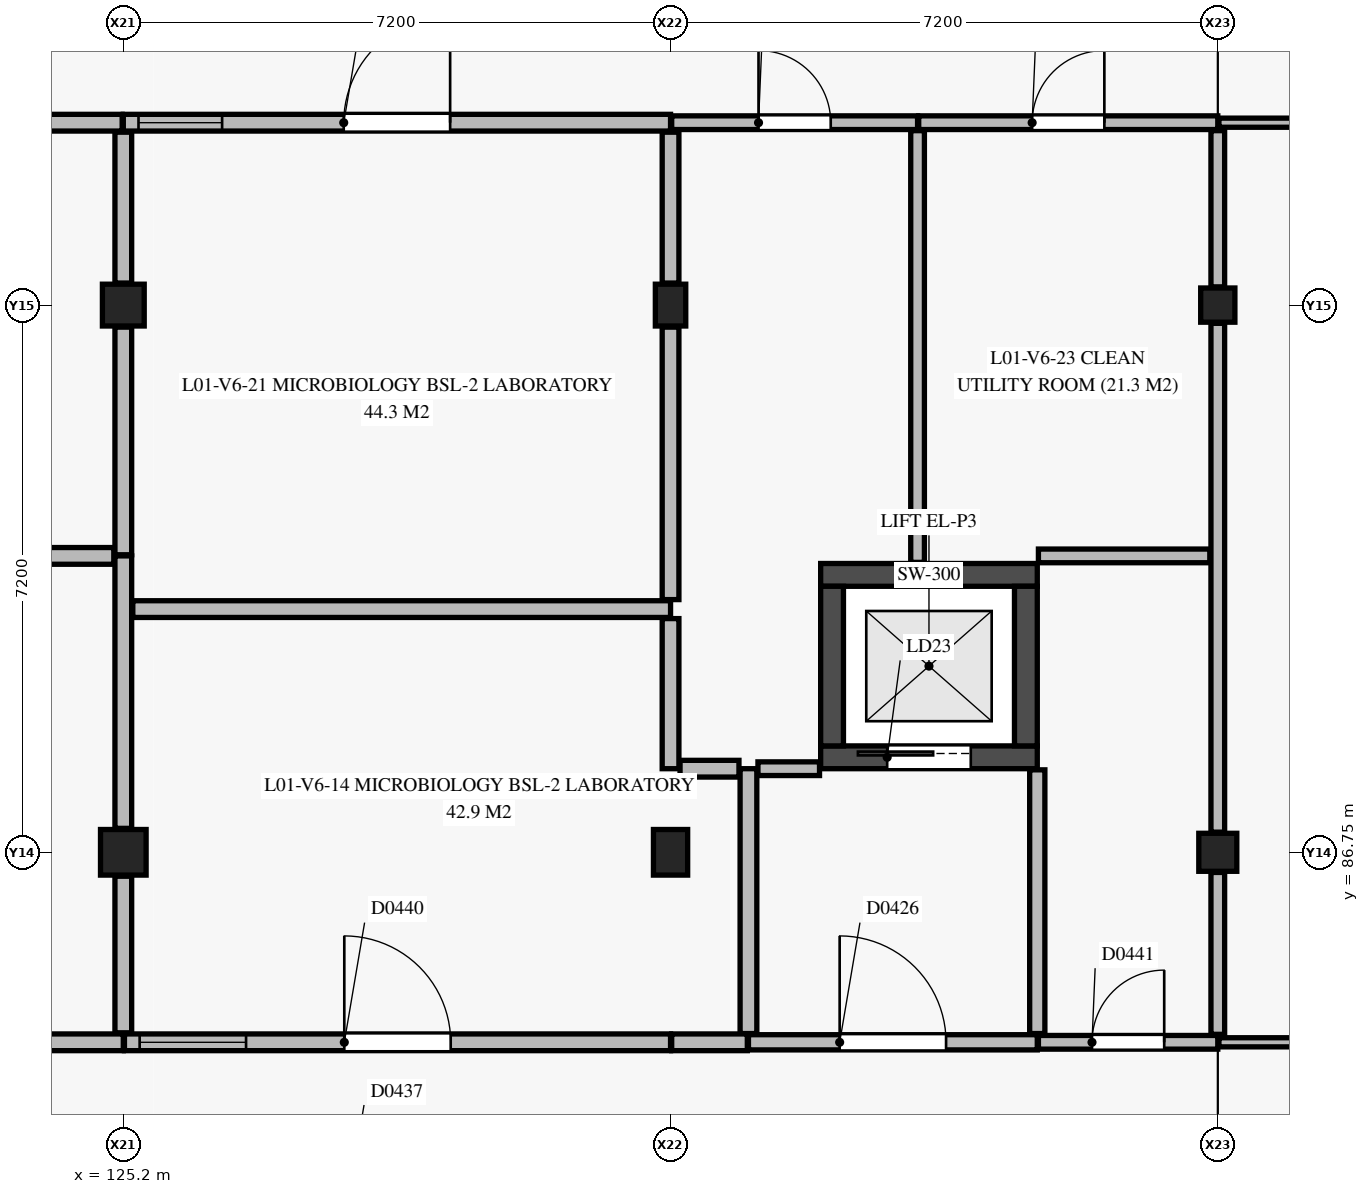
"""IFC4 building model, lengths in metres.
Left out: names, types, materials, properties, quantities, classifications, styles, units other than length and angle.
Written with IfcOpenShell. Run it as: python <this file> out.ifc"""

import sys

from ifc_helpers import new_model, si_unit, direction, frame, frame_2d, origin, origin_2d, place, context, subcontext, project, spatial, rectangle, extrude, element, fill, save


model = new_model("IFC4")
c1 = context("Model", 3, precision=1e-05, world=origin(), true_north=direction((0.0, 1.0)))
c2 = subcontext(c1, "Body", "Model", "MODEL_VIEW")
j1 = project(units=[si_unit("LENGTHUNIT", "METRE"), si_unit("PLANEANGLEUNIT", "RADIAN")], contexts=[c1])
p1 = place(None, origin())
s1 = spatial("IfcSite", under=j1, at=p1, CompositionType="ELEMENT")
p2 = place(p1, origin())
s2 = spatial("IfcBuilding", under=s1, at=p2, CompositionType="ELEMENT")
p3 = place(p2, frame((0.0, 0.0, 4.8)))
s3 = spatial("IfcBuildingStorey", under=s2, at=p3, CompositionType="ELEMENT", Elevation=4.8)
p4 = place(p3, frame((125.2, 86.75, 0.0), z_axis=(0.0, 0.0, 1.0), x_axis=(1.0, 0.0, 0.0)))
e1 = element("IfcColumn", 1, at=p4, inside=s3, PredefinedType="COLUMN", context=c2, shape_type="SweptSolid", body=[
    extrude(rectangle(XDim=0.6, YDim=0.6, at=origin_2d()), origin(), (0.0, 0.0, 1.0), 4.2),
])
p5 = place(p3, frame((125.2, 93.95, 0.0), z_axis=(0.0, 0.0, 1.0), x_axis=(1.0, 0.0, 0.0)))
e2 = element("IfcColumn", 2, at=p5, inside=s3, PredefinedType="COLUMN", context=c2, shape_type="SweptSolid", body=[
    extrude(rectangle(XDim=0.55, YDim=0.55, at=origin_2d()), origin(), (0.0, 0.0, 1.0), 4.2),
])
p6 = place(p3, frame((132.4, 86.75, 0.0), z_axis=(0.0, 0.0, 1.0), x_axis=(1.0, 0.0, 0.0)))
e3 = element("IfcColumn", 3, at=p6, inside=s3, PredefinedType="COLUMN", context=c2, shape_type="SweptSolid", body=[
    extrude(rectangle(XDim=0.45, YDim=0.6, at=origin_2d()), origin(), (0.0, 0.0, 1.0), 4.2),
])
p7 = place(p3, frame((132.4, 93.95, 0.0), z_axis=(0.0, 0.0, 1.0), x_axis=(1.0, 0.0, 0.0)))
e4 = element("IfcColumn", 4, at=p7, inside=s3, PredefinedType="COLUMN", context=c2, shape_type="SweptSolid", body=[
    extrude(rectangle(XDim=0.4, YDim=0.55, at=origin_2d()), origin(), (0.0, 0.0, 1.0), 4.2),
])
p8 = place(p3, frame((139.6, 86.75, 0.0), z_axis=(0.0, 0.0, 1.0), x_axis=(1.0, 0.0, 0.0)))
e5 = element("IfcColumn", 5, at=p8, inside=s3, PredefinedType="COLUMN", context=c2, shape_type="SweptSolid", body=[
    extrude(rectangle(XDim=0.5, YDim=0.5, at=origin_2d()), origin(), (0.0, 0.0, 1.0), 4.2),
])
p9 = place(p3, frame((139.6, 93.95, 0.0), z_axis=(0.0, 0.0, 1.0), x_axis=(1.0, 0.0, 0.0)))
e6 = element("IfcColumn", 6, at=p9, inside=s3, PredefinedType="COLUMN", context=c2, shape_type="SweptSolid", body=[
    extrude(rectangle(XDim=0.45, YDim=0.45, at=origin_2d()), origin(), (0.0, 0.0, 1.0), 4.2),
])
p10 = place(p3, frame((134.375, 88.0, 0.0), z_axis=(0.0, 0.0, 1.0), x_axis=(1.0, 0.0, 0.0)))
e7 = element("IfcWall", 7, at=p10, inside=s3, PredefinedType="SHEAR", context=c2, shape_type="SweptSolid", body=[
    extrude(rectangle(XDim=2.85, YDim=0.3, at=frame_2d((1.425, 0.0))), origin(), (0.0, 0.0, 1.0), 3.95),
])
p11 = place(p10, frame((0.875, 0.0, 0.0)))
e8 = element("IfcOpeningElement", 8, at=p11, cuts=e7, PredefinedType="OPENING", context=c2, shape_type="SweptSolid", body=[
    extrude(rectangle(XDim=1.1, YDim=2.15, at=frame_2d((0.55, 1.075))), frame((0.0, 0.16, 0.0), z_axis=(0.0, -1.0, 0.0), x_axis=(1.0, 0.0, 0.0)), (0.0, 0.0, 1.0), 0.32),
])
p12 = place(p3, frame((134.375, 90.4, 0.0), z_axis=(0.0, 0.0, 1.0), x_axis=(1.0, 0.0, 0.0)))
e9 = element("IfcWall", 9, at=p12, inside=s3, PredefinedType="SHEAR", context=c2, shape_type="SweptSolid", body=[
    extrude(rectangle(XDim=2.85, YDim=0.3, at=frame_2d((1.425, 0.0))), origin(), (0.0, 0.0, 1.0), 3.95),
])
for number, where, z_axis, x_axis in (
    (10, (134.525, 88.15, 0.0), (0.0, 0.0, 1.0), (0.0, 1.0, 0.0)),
    (11, (137.075, 88.15, 0.0), (0.0, 0.0, 1.0), (0.0, 1.0, 0.0)),
):
    element("IfcWall", number, at=place(p3, frame(where, z_axis=z_axis, x_axis=x_axis)), inside=s3, PredefinedType="SHEAR", context=c2, shape_type="SweptSolid", body=[
        extrude(rectangle(XDim=2.1, YDim=0.3, at=frame_2d((1.05, 0.0))), origin(), (0.0, 0.0, 1.0), 3.95),
    ])
p13 = place(p3, frame((133.425, 84.25, 0.0), z_axis=(0.0, 0.0, 1.0), x_axis=(1.0, 0.0, 0.0)))
e12 = element("IfcWall", 12, at=p13, inside=s3, PredefinedType="PARTITIONING", context=c2, shape_type="SweptSolid", body=[
    extrude(rectangle(XDim=3.8, YDim=0.2, at=frame_2d((1.9, 0.0))), origin(), (0.0, 0.0, 1.0), 3.475),
])
p14 = place(p13, frame((1.2, 0.0, 0.0)))
e13 = element("IfcOpeningElement", 13, at=p14, cuts=e12, PredefinedType="OPENING", context=c2, shape_type="SweptSolid", body=[
    extrude(rectangle(XDim=1.4, YDim=2.2, at=frame_2d((0.7, 1.1))), frame((0.0, 0.11, 0.0), z_axis=(0.0, -1.0, 0.0), x_axis=(1.0, 0.0, 0.0)), (0.0, 0.0, 1.0), 0.22),
])
p15 = place(p3, frame((133.425, 84.365, 0.0), z_axis=(0.0, 0.0, 1.0), x_axis=(0.0, 1.0, 0.0)))
e14 = element("IfcWall", 14, at=p15, inside=s3, PredefinedType="PARTITIONING", context=c2, shape_type="SweptSolid", body=[
    extrude(rectangle(XDim=3.485, YDim=0.22, at=frame_2d((1.743, 0.0))), origin(), (0.0, 0.0, 1.0), 3.415),
])
p16 = place(p3, frame((137.225, 84.365, 0.0), z_axis=(0.0, 0.0, 1.0), x_axis=(0.0, 1.0, 0.0)))
e15 = element("IfcWall", 15, at=p16, inside=s3, PredefinedType="PARTITIONING", context=c2, shape_type="SweptSolid", body=[
    extrude(rectangle(XDim=3.47, YDim=0.2, at=frame_2d((1.735, 0.0))), origin(), (0.0, 0.0, 1.0), 3.415),
])
p17 = place(p3, frame((122.8, 84.25, 0.0), z_axis=(0.0, 0.0, 1.0), x_axis=(1.0, 0.0, 0.0)))
e16 = element("IfcWall", 16, at=p17, inside=s3, PredefinedType="PARTITIONING", context=c2, shape_type="SweptSolid", body=[
    extrude(rectangle(XDim=2.4, YDim=0.22, at=frame_2d((1.2, 0.0))), origin(), (0.0, 0.0, 1.0), 3.135),
])
p18 = place(p3, frame((125.215, 84.25, 0.0), z_axis=(0.0, 0.0, 1.0), x_axis=(1.0, 0.0, 0.0)))
e17 = element("IfcWall", 17, at=p18, inside=s3, PredefinedType="PARTITIONING", context=c2, shape_type="SweptSolid", body=[
    extrude(rectangle(XDim=7.185, YDim=0.22, at=frame_2d((3.592, 0.0))), origin(), (0.0, 0.0, 1.0), 3.135),
])
p19 = place(p18, frame((2.893, 0.0, 0.0)))
e18 = element("IfcOpeningElement", 18, at=p19, cuts=e17, PredefinedType="OPENING", context=c2, shape_type="SweptSolid", body=[
    extrude(rectangle(XDim=1.4, YDim=2.2, at=frame_2d((0.7, 1.1))), frame((0.0, 0.12, 0.0), z_axis=(0.0, -1.0, 0.0), x_axis=(1.0, 0.0, 0.0)), (0.0, 0.0, 1.0), 0.24),
])
p20 = place(p18, frame((0.2, 0.0, 1.05)))
e19 = element("IfcOpeningElement", 19, at=p20, cuts=e17, PredefinedType="OPENING", context=c2, shape_type="SweptSolid", body=[
    extrude(rectangle(XDim=1.4, YDim=1.1, at=frame_2d((0.7, 0.55))), frame((0.0, 0.12, 0.0), z_axis=(0.0, -1.0, 0.0), x_axis=(1.0, 0.0, 0.0)), (0.0, 0.0, 1.0), 0.24),
])
p21 = place(p3, frame((132.415, 84.25, 0.0), z_axis=(0.0, 0.0, 1.0), x_axis=(1.0, 0.0, 0.0)))
e20 = element("IfcWall", 20, at=p21, inside=s3, PredefinedType="PARTITIONING", context=c2, shape_type="SweptSolid", body=[
    extrude(rectangle(XDim=0.995, YDim=0.22, at=frame_2d((0.498, 0.0))), origin(), (0.0, 0.0, 1.0), 3.355),
])
p22 = place(p3, frame((125.2, 96.35, 0.0), z_axis=(0.0, 0.0, 1.0), x_axis=(1.0, 0.0, 0.0)))
e21 = element("IfcWall", 21, at=p22, inside=s3, PredefinedType="PARTITIONING", context=c2, shape_type="SweptSolid", body=[
    extrude(rectangle(XDim=7.2, YDim=0.22, at=frame_2d((3.6, 0.0))), origin(), (0.0, 0.0, 1.0), 3.135),
])
p23 = place(p22, frame((2.9, 0.0, 0.0)))
e22 = element("IfcOpeningElement", 22, at=p23, cuts=e21, PredefinedType="OPENING", context=c2, shape_type="SweptSolid", body=[
    extrude(rectangle(XDim=1.4, YDim=2.2, at=frame_2d((0.7, 1.1))), frame((0.0, 0.12, 0.0), z_axis=(0.0, -1.0, 0.0), x_axis=(1.0, 0.0, 0.0)), (0.0, 0.0, 1.0), 0.24),
])
p24 = place(p22, frame((0.2, 0.0, 1.05)))
e23 = element("IfcOpeningElement", 23, at=p24, cuts=e21, PredefinedType="OPENING", context=c2, shape_type="SweptSolid", body=[
    extrude(rectangle(XDim=1.1, YDim=1.1, at=frame_2d((0.55, 0.55))), frame((0.0, 0.12, 0.0), z_axis=(0.0, -1.0, 0.0), x_axis=(1.0, 0.0, 0.0)), (0.0, 0.0, 1.0), 0.24),
])
p25 = place(p3, frame((122.925, 96.35, 0.0), z_axis=(0.0, 0.0, 1.0), x_axis=(1.0, 0.0, 0.0)))
e24 = element("IfcWall", 24, at=p25, inside=s3, PredefinedType="PARTITIONING", context=c2, shape_type="SweptSolid", body=[
    extrude(rectangle(XDim=2.26, YDim=0.22, at=frame_2d((1.13, 0.0))), origin(), (0.0, 0.0, 1.0), 3.355),
])
p26 = place(p3, frame((137.24, 84.25, 0.0), z_axis=(0.0, 0.0, 1.0), x_axis=(1.0, 0.0, 0.0)))
e25 = element("IfcWall", 25, at=p26, inside=s3, PredefinedType="PLUMBINGWALL", context=c2, shape_type="SweptSolid", body=[
    extrude(rectangle(XDim=2.36, YDim=0.18, at=frame_2d((1.18, 0.0))), origin(), (0.0, 0.0, 1.0), 3.235),
])
p27 = place(p26, frame((0.705, 0.0, 0.0)))
e26 = element("IfcOpeningElement", 26, at=p27, cuts=e25, PredefinedType="OPENING", context=c2, shape_type="SweptSolid", body=[
    extrude(rectangle(XDim=0.95, YDim=2.1, at=frame_2d((0.475, 1.05))), frame((0.0, 0.1, 0.0), z_axis=(0.0, -1.0, 0.0), x_axis=(1.0, 0.0, 0.0)), (0.0, 0.0, 1.0), 0.2),
])
p28 = place(p3, frame((132.415, 96.35, 0.0), z_axis=(0.0, 0.0, 1.0), x_axis=(1.0, 0.0, 0.0)))
e27 = element("IfcWall", 27, at=p28, inside=s3, PredefinedType="PLUMBINGWALL", context=c2, shape_type="SweptSolid", body=[
    extrude(rectangle(XDim=3.235, YDim=0.18, at=frame_2d((1.617, 0.0))), origin(), (0.0, 0.0, 1.0), 3.135),
])
p29 = place(p28, frame((1.143, 0.0, 0.0)))
e28 = element("IfcOpeningElement", 28, at=p29, cuts=e27, PredefinedType="OPENING", context=c2, shape_type="SweptSolid", body=[
    extrude(rectangle(XDim=0.95, YDim=2.1, at=frame_2d((0.475, 1.05))), frame((0.0, 0.1, 0.0), z_axis=(0.0, -1.0, 0.0), x_axis=(1.0, 0.0, 0.0)), (0.0, 0.0, 1.0), 0.2),
])
p30 = place(p3, frame((135.665, 96.35, 0.0), z_axis=(0.0, 0.0, 1.0), x_axis=(1.0, 0.0, 0.0)))
e29 = element("IfcWall", 29, at=p30, inside=s3, PredefinedType="PLUMBINGWALL", context=c2, shape_type="SweptSolid", body=[
    extrude(rectangle(XDim=3.935, YDim=0.18, at=frame_2d((1.968, 0.0))), origin(), (0.0, 0.0, 1.0), 3.355),
])
p31 = place(p30, frame((1.492, 0.0, 0.0)))
e30 = element("IfcOpeningElement", 30, at=p31, cuts=e29, PredefinedType="OPENING", context=c2, shape_type="SweptSolid", body=[
    extrude(rectangle(XDim=0.95, YDim=2.1, at=frame_2d((0.475, 1.05))), frame((0.0, 0.1, 0.0), z_axis=(0.0, -1.0, 0.0), x_axis=(1.0, 0.0, 0.0)), (0.0, 0.0, 1.0), 0.2),
])
p32 = place(p3, frame((139.615, 84.25, 0.0), z_axis=(0.0, 0.0, 1.0), x_axis=(1.0, 0.0, 0.0)))
e31 = element("IfcWall", 31, at=p32, inside=s3, PredefinedType="PARTITIONING", context=c2, shape_type="SweptSolid", body=[
    extrude(rectangle(XDim=7.17, YDim=0.12, at=frame_2d((3.585, 0.0))), origin(), (0.0, 0.0, 1.0), 3.235),
])
p33 = place(p32, frame((3.06, 0.0, 0.0)))
e32 = element("IfcOpeningElement", 32, at=p33, cuts=e31, PredefinedType="OPENING", context=c2, shape_type="SweptSolid", body=[
    extrude(rectangle(XDim=1.05, YDim=2.15, at=frame_2d((0.525, 1.075))), frame((0.0, 0.07, 0.0), z_axis=(0.0, -1.0, 0.0), x_axis=(1.0, 0.0, 0.0)), (0.0, 0.0, 1.0), 0.14),
])
p34 = place(p3, frame((139.615, 96.35, 0.0), z_axis=(0.0, 0.0, 1.0), x_axis=(1.0, 0.0, 0.0)))
e33 = element("IfcWall", 33, at=p34, inside=s3, PredefinedType="PARTITIONING", context=c2, shape_type="SweptSolid", body=[
    extrude(rectangle(XDim=4.785, YDim=0.12, at=frame_2d((2.393, 0.0))), origin(), (0.0, 0.0, 1.0), 3.355),
])
p35 = place(p3, frame((125.2, 84.375, 0.0), z_axis=(0.0, 0.0, 1.0), x_axis=(0.0, 1.0, 0.0)))
e34 = element("IfcWall", 34, at=p35, inside=s3, PredefinedType="PARTITIONING", context=c2, shape_type="SweptSolid", body=[
    extrude(rectangle(XDim=2.06, YDim=0.22, at=frame_2d((1.03, 0.0))), origin(), (0.0, 0.0, 1.0), 3.135),
])
p36 = place(p3, frame((125.2, 87.065, 0.0), z_axis=(0.0, 0.0, 1.0), x_axis=(0.0, 1.0, 0.0)))
e35 = element("IfcWall", 35, at=p36, inside=s3, PredefinedType="PARTITIONING", context=c2, shape_type="SweptSolid", body=[
    extrude(rectangle(XDim=3.585, YDim=0.22, at=frame_2d((1.792, 0.0))), origin(), (0.0, 0.0, 1.0), 3.235),
])
p37 = place(p3, frame((122.925, 90.65, 0.0), z_axis=(0.0, 0.0, 1.0), x_axis=(1.0, 0.0, 0.0)))
e36 = element("IfcWall", 36, at=p37, inside=s3, PredefinedType="PARTITIONING", context=c2, shape_type="SweptSolid", body=[
    extrude(rectangle(XDim=2.15, YDim=0.22, at=frame_2d((1.075, 0.0))), origin(), (0.0, 0.0, 1.0), 3.95),
])
p38 = place(p3, frame((125.325, 89.95, 0.0), z_axis=(0.0, 0.0, 1.0), x_axis=(1.0, 0.0, 0.0)))
e37 = element("IfcWall", 37, at=p38, inside=s3, PredefinedType="PARTITIONING", context=c2, shape_type="SweptSolid", body=[
    extrude(rectangle(XDim=7.075, YDim=0.22, at=frame_2d((3.538, 0.0))), origin(), (0.0, 0.0, 1.0), 3.385),
])
p39 = place(p3, frame((132.4, 87.85, 0.0), z_axis=(0.0, 0.0, 1.0), x_axis=(0.0, 1.0, 0.0)))
e38 = element("IfcWall", 38, at=p39, inside=s3, PredefinedType="PARTITIONING", context=c2, shape_type="SweptSolid", body=[
    extrude(rectangle(XDim=1.975, YDim=0.22, at=frame_2d((0.987, 0.0))), origin(), (0.0, 0.0, 1.0), 3.385),
])
p40 = place(p3, frame((132.525, 87.85, 0.0), z_axis=(0.0, 0.0, 1.0), x_axis=(1.0, 0.0, 0.0)))
e39 = element("IfcWall", 39, at=p40, inside=s3, PredefinedType="PARTITIONING", context=c2, shape_type="SweptSolid", body=[
    extrude(rectangle(XDim=0.775, YDim=0.22, at=frame_2d((0.388, 0.0))), origin(), (0.0, 0.0, 1.0), 3.95),
])
p41 = place(p3, frame((132.4, 90.075, 0.0), z_axis=(0.0, 0.0, 1.0), x_axis=(0.0, 1.0, 0.0)))
e40 = element("IfcWall", 40, at=p41, inside=s3, PredefinedType="PARTITIONING", context=c2, shape_type="SweptSolid", body=[
    extrude(rectangle(XDim=3.585, YDim=0.22, at=frame_2d((1.792, 0.0))), origin(), (0.0, 0.0, 1.0), 3.385),
])
p42 = place(p3, frame((132.4, 94.24, 0.0), z_axis=(0.0, 0.0, 1.0), x_axis=(0.0, 1.0, 0.0)))
e41 = element("IfcWall", 41, at=p42, inside=s3, PredefinedType="PARTITIONING", context=c2, shape_type="SweptSolid", body=[
    extrude(rectangle(XDim=1.985, YDim=0.22, at=frame_2d((0.993, 0.0))), origin(), (0.0, 0.0, 1.0), 3.135),
])
p43 = place(p3, frame((125.2, 90.665, 0.0), z_axis=(0.0, 0.0, 1.0), x_axis=(0.0, 1.0, 0.0)))
e42 = element("IfcWall", 42, at=p43, inside=s3, PredefinedType="PARTITIONING", context=c2, shape_type="SweptSolid", body=[
    extrude(rectangle(XDim=2.995, YDim=0.22, at=frame_2d((1.498, 0.0))), origin(), (0.0, 0.0, 1.0), 3.235),
])
p44 = place(p3, frame((125.2, 94.24, 0.0), z_axis=(0.0, 0.0, 1.0), x_axis=(0.0, 1.0, 0.0)))
e43 = element("IfcWall", 43, at=p44, inside=s3, PredefinedType="PARTITIONING", context=c2, shape_type="SweptSolid", body=[
    extrude(rectangle(XDim=1.985, YDim=0.22, at=frame_2d((0.993, 0.0))), origin(), (0.0, 0.0, 1.0), 3.355),
])
p45 = place(p3, frame((139.6, 84.355, 0.0), z_axis=(0.0, 0.0, 1.0), x_axis=(0.0, 1.0, 0.0)))
e44 = element("IfcWall", 44, at=p45, inside=s3, PredefinedType="PLUMBINGWALL", context=c2, shape_type="SweptSolid", body=[
    extrude(rectangle(XDim=2.13, YDim=0.18, at=frame_2d((1.065, 0.0))), origin(), (0.0, 0.0, 1.0), 3.235),
])
p46 = place(p3, frame((139.6, 87.015, 0.0), z_axis=(0.0, 0.0, 1.0), x_axis=(0.0, 1.0, 0.0)))
e45 = element("IfcWall", 45, at=p46, inside=s3, PredefinedType="PLUMBINGWALL", context=c2, shape_type="SweptSolid", body=[
    extrude(rectangle(XDim=6.695, YDim=0.18, at=frame_2d((3.348, 0.0))), origin(), (0.0, 0.0, 1.0), 3.355),
])
p47 = place(p3, frame((139.6, 94.19, 0.0), z_axis=(0.0, 0.0, 1.0), x_axis=(0.0, 1.0, 0.0)))
e46 = element("IfcWall", 46, at=p47, inside=s3, PredefinedType="PLUMBINGWALL", context=c2, shape_type="SweptSolid", body=[
    extrude(rectangle(XDim=2.055, YDim=0.18, at=frame_2d((1.028, 0.0))), origin(), (0.0, 0.0, 1.0), 3.355),
])
p48 = place(p3, frame((137.24, 90.65, 0.0), z_axis=(0.0, 0.0, 1.0), x_axis=(1.0, 0.0, 0.0)))
e47 = element("IfcWall", 47, at=p48, inside=s3, PredefinedType="PLUMBINGWALL", context=c2, shape_type="SweptSolid", body=[
    extrude(rectangle(XDim=2.255, YDim=0.18, at=frame_2d((1.127, 0.0))), origin(), (0.0, 0.0, 1.0), 3.355),
])
p49 = place(p3, frame((135.65, 90.565, 0.0), z_axis=(0.0, 0.0, 1.0), x_axis=(0.0, 1.0, 0.0)))
e48 = element("IfcWall", 48, at=p49, inside=s3, PredefinedType="PLUMBINGWALL", context=c2, shape_type="SweptSolid", body=[
    extrude(rectangle(XDim=5.68, YDim=0.18, at=frame_2d((2.84, 0.0))), origin(), (0.0, 0.0, 1.0), 3.235),
])
p50 = place(p3, frame((133.55, 87.85, 0.0), z_axis=(0.0, 0.0, 1.0), x_axis=(1.0, 0.0, 0.0)))
e49 = element("IfcWall", 49, at=p50, inside=s3, PredefinedType="PLUMBINGWALL", context=c2, shape_type="SweptSolid", body=[
    extrude(rectangle(XDim=0.81, YDim=0.18, at=frame_2d((0.405, 0.0))), origin(), (0.0, 0.0, 1.0), 3.95),
])
p51 = place(p11, origin())
e50 = element("IfcDoor", 50, at=p51, inside=s3, OperationType="SLIDING_TO_LEFT", PredefinedType="DOOR", context=c2, shape_type="SweptSolid", body=[
    extrude(rectangle(XDim=1.1, YDim=2.15, at=frame_2d((0.55, 1.075))), frame((0.0, 0.025, 0.0), z_axis=(0.0, -1.0, 0.0), x_axis=(1.0, 0.0, 0.0)), (0.0, 0.0, 1.0), 0.05),
])
fill(e8, e50)
p52 = place(p14, origin())
e51 = element("IfcDoor", 51, at=p52, inside=s3, OperationType="SINGLE_SWING_LEFT", PredefinedType="DOOR", context=c2, shape_type="SweptSolid", body=[
    extrude(rectangle(XDim=1.4, YDim=2.2, at=frame_2d((0.7, 1.1))), frame((0.0, 0.025, 0.0), z_axis=(0.0, -1.0, 0.0), x_axis=(1.0, 0.0, 0.0)), (0.0, 0.0, 1.0), 0.05),
])
fill(e13, e51)
p53 = place(p19, origin())
e52 = element("IfcDoor", 52, at=p53, inside=s3, OperationType="SINGLE_SWING_LEFT", PredefinedType="DOOR", context=c2, shape_type="SweptSolid", body=[
    extrude(rectangle(XDim=1.4, YDim=2.2, at=frame_2d((0.7, 1.1))), frame((0.0, 0.025, 0.0), z_axis=(0.0, -1.0, 0.0), x_axis=(1.0, 0.0, 0.0)), (0.0, 0.0, 1.0), 0.05),
])
fill(e18, e52)
p54 = place(p20, origin())
e53 = element("IfcWindow", 53, at=p54, inside=s3, PartitioningType="SINGLE_PANEL", PredefinedType="WINDOW", context=c2, shape_type="SweptSolid", body=[
    extrude(rectangle(XDim=1.4, YDim=1.1, at=frame_2d((0.7, 0.55))), frame((0.0, 0.03, 0.0), z_axis=(0.0, -1.0, 0.0), x_axis=(1.0, 0.0, 0.0)), (0.0, 0.0, 1.0), 0.06),
])
fill(e19, e53)
p55 = place(p27, origin())
e54 = element("IfcDoor", 54, at=p55, inside=s3, OperationType="SINGLE_SWING_RIGHT", PredefinedType="DOOR", context=c2, shape_type="SweptSolid", body=[
    extrude(rectangle(XDim=0.95, YDim=2.1, at=frame_2d((0.475, 1.05))), frame((0.0, 0.025, 0.0), z_axis=(0.0, -1.0, 0.0), x_axis=(1.0, 0.0, 0.0)), (0.0, 0.0, 1.0), 0.05),
])
fill(e26, e54)
p56 = place(p29, origin())
e55 = element("IfcDoor", 55, at=p56, inside=s3, OperationType="SINGLE_SWING_LEFT", PredefinedType="DOOR", context=c2, shape_type="SweptSolid", body=[
    extrude(rectangle(XDim=0.95, YDim=2.1, at=frame_2d((0.475, 1.05))), frame((0.0, 0.025, 0.0), z_axis=(0.0, -1.0, 0.0), x_axis=(1.0, 0.0, 0.0)), (0.0, 0.0, 1.0), 0.05),
])
fill(e28, e55)
p57 = place(p23, origin())
e56 = element("IfcDoor", 56, at=p57, inside=s3, OperationType="SINGLE_SWING_RIGHT", PredefinedType="DOOR", context=c2, shape_type="SweptSolid", body=[
    extrude(rectangle(XDim=1.4, YDim=2.2, at=frame_2d((0.7, 1.1))), frame((0.0, 0.025, 0.0), z_axis=(0.0, -1.0, 0.0), x_axis=(1.0, 0.0, 0.0)), (0.0, 0.0, 1.0), 0.05),
])
fill(e22, e56)
p58 = place(p24, origin())
e57 = element("IfcWindow", 57, at=p58, inside=s3, PartitioningType="SINGLE_PANEL", PredefinedType="WINDOW", context=c2, shape_type="SweptSolid", body=[
    extrude(rectangle(XDim=1.1, YDim=1.1, at=frame_2d((0.55, 0.55))), frame((0.0, 0.03, 0.0), z_axis=(0.0, -1.0, 0.0), x_axis=(1.0, 0.0, 0.0)), (0.0, 0.0, 1.0), 0.06),
])
fill(e23, e57)
p59 = place(p31, origin())
e58 = element("IfcDoor", 58, at=p59, inside=s3, OperationType="SINGLE_SWING_RIGHT", PredefinedType="DOOR", context=c2, shape_type="SweptSolid", body=[
    extrude(rectangle(XDim=0.95, YDim=2.1, at=frame_2d((0.475, 1.05))), frame((0.0, 0.025, 0.0), z_axis=(0.0, -1.0, 0.0), x_axis=(1.0, 0.0, 0.0)), (0.0, 0.0, 1.0), 0.05),
])
fill(e30, e58)
save(model, sys.argv[1])
